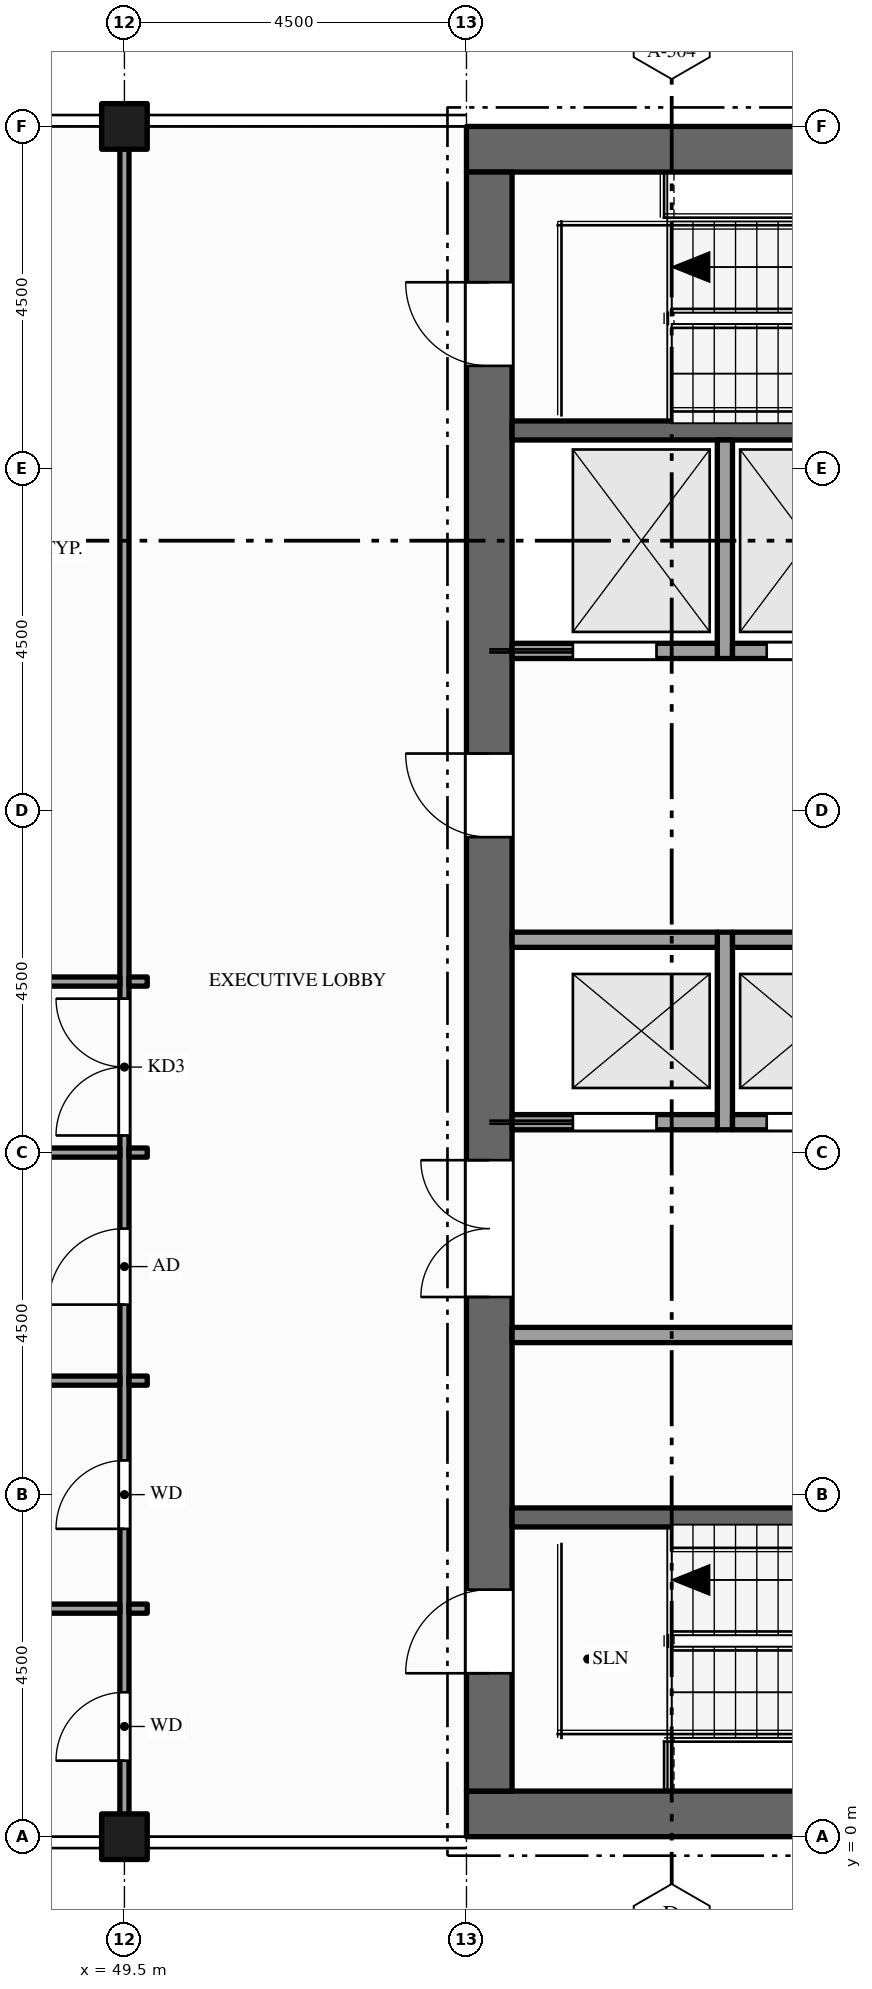
"""IFC4 building model, lengths in metres.
Left out: names, types, materials, properties, quantities, classifications, styles, units other than length and angle.
Written with IfcOpenShell. Run it as: python <this file> out.ifc"""

import sys

from ifc_helpers import new_model, si_unit, direction, frame, frame_2d, origin, origin_2d, place, context, subcontext, project, spatial, rectangle, hollow_rectangle, extrude, element, fill, save


model = new_model("IFC4")
c1 = context("Model", 3, precision=1e-05, world=origin(), true_north=direction((0.0, 1.0)))
c2 = subcontext(c1, "Body", "Model", "MODEL_VIEW")
j1 = project(units=[si_unit("LENGTHUNIT", "METRE"), si_unit("PLANEANGLEUNIT", "RADIAN")], contexts=[c1])
p1 = place(None, origin())
s1 = spatial("IfcSite", under=j1, at=p1, CompositionType="ELEMENT")
p2 = place(p1, origin())
s2 = spatial("IfcBuilding", under=s1, at=p2, CompositionType="ELEMENT")
p3 = place(p2, frame((0.0, 0.0, 327.5)))
s3 = spatial("IfcBuildingStorey", under=s2, at=p3, CompositionType="ELEMENT", Elevation=327.5)
for number, where, z_axis, x_axis in (
    (1, (67.5, 0.3, -0.15), (0.0, 0.0, 1.0), (-1.0, 0.0, 0.0)),
    (2, (54.0, 22.2, -0.15), (0.0, 0.0, 1.0), (1.0, 0.0, 0.0)),
):
    element("IfcWall", number, at=place(p3, frame(where, z_axis=z_axis, x_axis=x_axis)), inside=s3, PredefinedType="SHEAR", context=c2, shape_type="SweptSolid", body=[
        extrude(rectangle(XDim=13.5, YDim=0.6, at=frame_2d((6.75, 0.0))), origin(), (0.0, 0.0, 1.0), 4.5),
    ])
p4 = place(p3, frame((54.3, 0.6, -0.15), z_axis=(0.0, 0.0, 1.0), x_axis=(0.0, 1.0, 0.0)))
e3 = element("IfcWall", 3, at=p4, inside=s3, PredefinedType="SHEAR", context=c2, shape_type="SweptSolid", body=[
    extrude(rectangle(XDim=21.3, YDim=0.6, at=frame_2d((10.65, 0.0))), origin(), (0.0, 0.0, 1.0), 4.5),
])
p5 = place(p4, frame((6.5, 0.0, 0.15)))
e4 = element("IfcOpeningElement", 4, at=p5, cuts=e3, PredefinedType="OPENING", context=c2, shape_type="SweptSolid", body=[
    extrude(rectangle(XDim=1.8, YDim=2.1, at=frame_2d((0.9, 1.05))), frame((0.0, 0.31, 0.0), z_axis=(0.0, -1.0, 0.0), x_axis=(1.0, 0.0, 0.0)), (0.0, 0.0, 1.0), 0.62),
])
p6 = place(p4, frame((12.55, 0.0, 0.15)))
e5 = element("IfcOpeningElement", 5, at=p6, cuts=e3, PredefinedType="OPENING", context=c2, shape_type="SweptSolid", body=[
    extrude(rectangle(XDim=1.1, YDim=2.1, at=frame_2d((0.55, 1.05))), frame((0.0, 0.31, 0.0), z_axis=(0.0, -1.0, 0.0), x_axis=(1.0, 0.0, 0.0)), (0.0, 0.0, 1.0), 0.62),
])
p7 = place(p4, frame((1.55, 0.0, 0.15)))
e6 = element("IfcOpeningElement", 6, at=p7, cuts=e3, PredefinedType="OPENING", context=c2, shape_type="SweptSolid", body=[
    extrude(rectangle(XDim=1.1, YDim=2.1, at=frame_2d((0.55, 1.05))), frame((0.0, 0.31, 0.0), z_axis=(0.0, -1.0, 0.0), x_axis=(1.0, 0.0, 0.0)), (0.0, 0.0, 1.0), 0.62),
])
p8 = place(p4, frame((18.75, 0.0, 0.15)))
e7 = element("IfcOpeningElement", 7, at=p8, cuts=e3, PredefinedType="OPENING", context=c2, shape_type="SweptSolid", body=[
    extrude(rectangle(XDim=1.1, YDim=2.1, at=frame_2d((0.55, 1.05))), frame((0.0, 0.31, 0.0), z_axis=(0.0, -1.0, 0.0), x_axis=(1.0, 0.0, 0.0)), (0.0, 0.0, 1.0), 0.62),
])
for number, where, z_axis, x_axis in (
    (8, (49.5, 0.0, -0.15), (0.0, 0.0, 1.0), (1.0, 0.0, 0.0)),
    (9, (49.5, 22.5, -0.15), (0.0, 0.0, 1.0), (1.0, 0.0, 0.0)),
):
    element("IfcColumn", number, at=place(p3, frame(where, z_axis=z_axis, x_axis=x_axis)), inside=s3, PredefinedType="COLUMN", context=c2, shape_type="SweptSolid", body=[
        extrude(hollow_rectangle(XDim=0.6, YDim=0.6, WallThickness=0.03, at=origin_2d()), origin(), (0.0, 0.0, 1.0), 4.5),
    ])
p9 = place(p3, frame((49.5, 0.01, 0.0), z_axis=(0.0, 0.0, 1.0), x_axis=(0.0, 1.0, 0.0)))
e10 = element("IfcWall", 10, at=p9, inside=s3, PredefinedType="PARTITIONING", context=c2, shape_type="SweptSolid", body=[
    extrude(rectangle(XDim=22.48, YDim=0.12, at=frame_2d((11.24, 0.0))), origin(), (0.0, 0.0, 1.0), 3.359),
])
p10 = place(p9, frame((9.215, 0.0, 0.0)))
e11 = element("IfcOpeningElement", 11, at=p10, cuts=e10, PredefinedType="OPENING", context=c2, shape_type="SweptSolid", body=[
    extrude(rectangle(XDim=1.8, YDim=2.1, at=frame_2d((0.9, 1.05))), frame((0.0, 0.07, 0.0), z_axis=(0.0, -1.0, 0.0), x_axis=(1.0, 0.0, 0.0)), (0.0, 0.0, 1.0), 0.14),
])
p11 = place(p9, frame((0.99, 0.0, 0.0)))
e12 = element("IfcOpeningElement", 12, at=p11, cuts=e10, PredefinedType="OPENING", context=c2, shape_type="SweptSolid", body=[
    extrude(rectangle(XDim=0.9, YDim=2.1, at=frame_2d((0.45, 1.05))), frame((0.0, 0.07, 0.0), z_axis=(0.0, -1.0, 0.0), x_axis=(1.0, 0.0, 0.0)), (0.0, 0.0, 1.0), 0.14),
])
p12 = place(p9, frame((4.04, 0.0, 0.0)))
e13 = element("IfcOpeningElement", 13, at=p12, cuts=e10, PredefinedType="OPENING", context=c2, shape_type="SweptSolid", body=[
    extrude(rectangle(XDim=0.9, YDim=2.1, at=frame_2d((0.45, 1.05))), frame((0.0, 0.07, 0.0), z_axis=(0.0, -1.0, 0.0), x_axis=(1.0, 0.0, 0.0)), (0.0, 0.0, 1.0), 0.14),
])
p13 = place(p9, frame((6.99, 0.0, 0.0)))
e14 = element("IfcOpeningElement", 14, at=p13, cuts=e10, PredefinedType="OPENING", context=c2, shape_type="SweptSolid", body=[
    extrude(rectangle(XDim=1.0, YDim=2.1, at=frame_2d((0.5, 1.05))), frame((0.0, 0.07, 0.0), z_axis=(0.0, -1.0, 0.0), x_axis=(1.0, 0.0, 0.0)), (0.0, 0.0, 1.0), 0.14),
])
p14 = place(p3, frame((57.4, 9.3, 0.0), z_axis=(0.0, 0.0, 1.0), x_axis=(0.0, 1.0, 0.0)))
e15 = element("IfcWall", 15, at=p14, inside=s3, PredefinedType="SOLIDWALL", context=c2, shape_type="SweptSolid", body=[
    extrude(rectangle(XDim=2.6, YDim=0.2, at=frame_2d((1.3, 0.0))), origin(), (0.0, 0.0, 1.0), 4.35),
])
p15 = place(p3, frame((57.4, 15.5, 0.0), z_axis=(0.0, 0.0, 1.0), x_axis=(0.0, 1.0, 0.0)))
e16 = element("IfcWall", 16, at=p15, inside=s3, PredefinedType="SOLIDWALL", context=c2, shape_type="SweptSolid", body=[
    extrude(rectangle(XDim=2.875, YDim=0.2, at=frame_2d((1.438, 0.0))), origin(), (0.0, 0.0, 1.0), 4.35),
])
p16 = place(p3, frame((45.06, 3.0, 0.0), z_axis=(0.0, 0.0, 1.0), x_axis=(1.0, 0.0, 0.0)))
e17 = element("IfcWall", 17, at=p16, inside=s3, PredefinedType="PARTITIONING", context=c2, shape_type="SweptSolid", body=[
    extrude(rectangle(XDim=4.38, YDim=0.12, at=frame_2d((2.19, 0.0))), origin(), (0.0, 0.0, 1.0), 3.359),
])
p17 = place(p3, frame((49.56, 3.0, 0.0), z_axis=(0.0, 0.0, 1.0), x_axis=(1.0, 0.0, 0.0)))
e18 = element("IfcWall", 18, at=p17, inside=s3, PredefinedType="PARTITIONING", context=c2, shape_type="SweptSolid", body=[
    extrude(rectangle(XDim=0.24, YDim=0.12, at=frame_2d((0.12, 0.0))), origin(), (0.0, 0.0, 1.0), 3.359),
])
p18 = place(p3, frame((54.6, 4.2, 0.0), z_axis=(0.0, 0.0, 1.0), x_axis=(1.0, 0.0, 0.0)))
e19 = element("IfcWall", 19, at=p18, inside=s3, PredefinedType="SHEAR", context=c2, shape_type="SweptSolid", body=[
    extrude(rectangle(XDim=6.675, YDim=0.25, at=frame_2d((3.337, 0.0))), origin(), (0.0, 0.0, 1.0), 4.35),
])
p19 = place(p3, frame((45.06, 6.0, 0.0), z_axis=(0.0, 0.0, 1.0), x_axis=(1.0, 0.0, 0.0)))
e20 = element("IfcWall", 20, at=p19, inside=s3, PredefinedType="PARTITIONING", context=c2, shape_type="SweptSolid", body=[
    extrude(rectangle(XDim=4.38, YDim=0.12, at=frame_2d((2.19, 0.0))), origin(), (0.0, 0.0, 1.0), 3.359),
])
p20 = place(p3, frame((49.56, 6.0, 0.0), z_axis=(0.0, 0.0, 1.0), x_axis=(1.0, 0.0, 0.0)))
e21 = element("IfcWall", 21, at=p20, inside=s3, PredefinedType="PARTITIONING", context=c2, shape_type="SweptSolid", body=[
    extrude(rectangle(XDim=0.24, YDim=0.12, at=frame_2d((0.12, 0.0))), origin(), (0.0, 0.0, 1.0), 3.359),
])
p21 = place(p3, frame((54.6, 6.6, 0.0), z_axis=(0.0, 0.0, 1.0), x_axis=(1.0, 0.0, 0.0)))
e22 = element("IfcWall", 22, at=p21, inside=s3, PredefinedType="PARTITIONING", context=c2, shape_type="SweptSolid", body=[
    extrude(rectangle(XDim=9.25, YDim=0.2, at=frame_2d((4.625, 0.0))), origin(), (0.0, 0.0, 1.0), 4.35),
])
p22 = place(p21, frame((4.175, 0.0, 0.0)))
e23 = element("IfcOpeningElement", 23, at=p22, cuts=e22, PredefinedType="OPENING", context=c2, shape_type="SweptSolid", body=[
    extrude(rectangle(XDim=0.9, YDim=2.1, at=frame_2d((0.45, 1.05))), frame((0.0, 0.11, 0.0), z_axis=(0.0, -1.0, 0.0), x_axis=(1.0, 0.0, 0.0)), (0.0, 0.0, 1.0), 0.22),
])
p23 = place(p3, frame((45.06, 9.0, 0.0), z_axis=(0.0, 0.0, 1.0), x_axis=(1.0, 0.0, 0.0)))
e24 = element("IfcWall", 24, at=p23, inside=s3, PredefinedType="PARTITIONING", context=c2, shape_type="SweptSolid", body=[
    extrude(rectangle(XDim=4.38, YDim=0.12, at=frame_2d((2.19, 0.0))), origin(), (0.0, 0.0, 1.0), 3.359),
])
p24 = place(p3, frame((49.56, 9.0, 0.0), z_axis=(0.0, 0.0, 1.0), x_axis=(1.0, 0.0, 0.0)))
e25 = element("IfcWall", 25, at=p24, inside=s3, PredefinedType="PARTITIONING", context=c2, shape_type="SweptSolid", body=[
    extrude(rectangle(XDim=0.24, YDim=0.12, at=frame_2d((0.12, 0.0))), origin(), (0.0, 0.0, 1.0), 3.359),
])
p25 = place(p3, frame((54.6, 9.4, 0.0), z_axis=(0.0, 0.0, 1.0), x_axis=(1.0, 0.0, 0.0)))
e26 = element("IfcWall", 26, at=p25, inside=s3, PredefinedType="SOLIDWALL", context=c2, shape_type="SweptSolid", body=[
    extrude(rectangle(XDim=2.7, YDim=0.2, at=frame_2d((1.35, 0.0))), origin(), (0.0, 0.0, 1.0), 4.35),
])
p26 = place(p25, frame((0.8, 0.0, 0.012)))
e27 = element("IfcOpeningElement", 27, at=p26, cuts=e26, PredefinedType="OPENING", context=c2, shape_type="SweptSolid", body=[
    extrude(rectangle(XDim=1.1, YDim=2.1, at=frame_2d((0.55, 1.05))), frame((0.0, 0.11, 0.0), z_axis=(0.0, -1.0, 0.0), x_axis=(1.0, 0.0, 0.0)), (0.0, 0.0, 1.0), 0.22),
])
p27 = place(p3, frame((57.5, 9.4, 0.0), z_axis=(0.0, 0.0, 1.0), x_axis=(1.0, 0.0, 0.0)))
e28 = element("IfcWall", 28, at=p27, inside=s3, PredefinedType="SOLIDWALL", context=c2, shape_type="SweptSolid", body=[
    extrude(rectangle(XDim=2.0, YDim=0.2, at=frame_2d((1.0, 0.0))), origin(), (0.0, 0.0, 1.0), 4.35),
])
p28 = place(p27, frame((0.45, 0.0, 0.012)))
e29 = element("IfcOpeningElement", 29, at=p28, cuts=e28, PredefinedType="OPENING", context=c2, shape_type="SweptSolid", body=[
    extrude(rectangle(XDim=1.1, YDim=2.1, at=frame_2d((0.55, 1.05))), frame((0.0, 0.11, 0.0), z_axis=(0.0, -1.0, 0.0), x_axis=(1.0, 0.0, 0.0)), (0.0, 0.0, 1.0), 0.22),
])
p29 = place(p3, frame((40.56, 11.25, 0.0), z_axis=(0.0, 0.0, 1.0), x_axis=(1.0, 0.0, 0.0)))
e30 = element("IfcWall", 30, at=p29, inside=s3, PredefinedType="PARTITIONING", context=c2, shape_type="SweptSolid", body=[
    extrude(rectangle(XDim=8.88, YDim=0.12, at=frame_2d((4.44, 0.0))), origin(), (0.0, 0.0, 1.0), 3.359),
])
p30 = place(p29, frame((3.84, 0.0, 0.0)))
e31 = element("IfcOpeningElement", 31, at=p30, cuts=e30, PredefinedType="OPENING", context=c2, shape_type="SweptSolid", body=[
    extrude(rectangle(XDim=1.2, YDim=2.1, at=frame_2d((0.6, 1.05))), frame((0.0, 0.07, 0.0), z_axis=(0.0, -1.0, 0.0), x_axis=(1.0, 0.0, 0.0)), (0.0, 0.0, 1.0), 0.14),
])
p31 = place(p3, frame((49.56, 11.25, 0.0), z_axis=(0.0, 0.0, 1.0), x_axis=(1.0, 0.0, 0.0)))
e32 = element("IfcWall", 32, at=p31, inside=s3, PredefinedType="PARTITIONING", context=c2, shape_type="SweptSolid", body=[
    extrude(rectangle(XDim=0.24, YDim=0.12, at=frame_2d((0.12, 0.0))), origin(), (0.0, 0.0, 1.0), 3.359),
])
p32 = place(p3, frame((54.6, 11.8, 0.0), z_axis=(0.0, 0.0, 1.0), x_axis=(1.0, 0.0, 0.0)))
e33 = element("IfcWall", 33, at=p32, inside=s3, PredefinedType="SOLIDWALL", context=c2, shape_type="SweptSolid", body=[
    extrude(rectangle(XDim=2.7, YDim=0.2, at=frame_2d((1.35, 0.0))), origin(), (0.0, 0.0, 1.0), 4.35),
])
p33 = place(p3, frame((57.5, 11.8, 0.0), z_axis=(0.0, 0.0, 1.0), x_axis=(1.0, 0.0, 0.0)))
e34 = element("IfcWall", 34, at=p33, inside=s3, PredefinedType="SOLIDWALL", context=c2, shape_type="SweptSolid", body=[
    extrude(rectangle(XDim=2.0, YDim=0.2, at=frame_2d((1.0, 0.0))), origin(), (0.0, 0.0, 1.0), 4.35),
])
p34 = place(p3, frame((54.6, 15.6, 0.0), z_axis=(0.0, 0.0, 1.0), x_axis=(1.0, 0.0, 0.0)))
e35 = element("IfcWall", 35, at=p34, inside=s3, PredefinedType="SOLIDWALL", context=c2, shape_type="SweptSolid", body=[
    extrude(rectangle(XDim=2.7, YDim=0.2, at=frame_2d((1.35, 0.0))), origin(), (0.0, 0.0, 1.0), 4.35),
])
p35 = place(p34, frame((0.8, 0.0, 0.012)))
e36 = element("IfcOpeningElement", 36, at=p35, cuts=e35, PredefinedType="OPENING", context=c2, shape_type="SweptSolid", body=[
    extrude(rectangle(XDim=1.1, YDim=2.1, at=frame_2d((0.55, 1.05))), frame((0.0, 0.11, 0.0), z_axis=(0.0, -1.0, 0.0), x_axis=(1.0, 0.0, 0.0)), (0.0, 0.0, 1.0), 0.22),
])
p36 = place(p3, frame((57.5, 15.6, 0.0), z_axis=(0.0, 0.0, 1.0), x_axis=(1.0, 0.0, 0.0)))
e37 = element("IfcWall", 37, at=p36, inside=s3, PredefinedType="SOLIDWALL", context=c2, shape_type="SweptSolid", body=[
    extrude(rectangle(XDim=2.0, YDim=0.2, at=frame_2d((1.0, 0.0))), origin(), (0.0, 0.0, 1.0), 4.35),
])
p37 = place(p36, frame((0.45, 0.0, 0.012)))
e38 = element("IfcOpeningElement", 38, at=p37, cuts=e37, PredefinedType="OPENING", context=c2, shape_type="SweptSolid", body=[
    extrude(rectangle(XDim=1.1, YDim=2.1, at=frame_2d((0.55, 1.05))), frame((0.0, 0.11, 0.0), z_axis=(0.0, -1.0, 0.0), x_axis=(1.0, 0.0, 0.0)), (0.0, 0.0, 1.0), 0.22),
])
p38 = place(p3, frame((54.6, 18.5, 0.0), z_axis=(0.0, 0.0, 1.0), x_axis=(1.0, 0.0, 0.0)))
e39 = element("IfcWall", 39, at=p38, inside=s3, PredefinedType="SHEAR", context=c2, shape_type="SweptSolid", body=[
    extrude(rectangle(XDim=6.675, YDim=0.25, at=frame_2d((3.337, 0.0))), origin(), (0.0, 0.0, 1.0), 4.35),
])
p39 = place(p26, origin())
e40 = element("IfcDoor", 40, at=p39, inside=s3, OperationType="SLIDING_TO_LEFT", PredefinedType="DOOR", context=c2, shape_type="SweptSolid", body=[
    extrude(rectangle(XDim=1.1, YDim=2.1, at=frame_2d((0.55, 1.05))), frame((0.0, 0.025, 0.0), z_axis=(0.0, -1.0, 0.0), x_axis=(1.0, 0.0, 0.0)), (0.0, 0.0, 1.0), 0.05),
])
fill(e27, e40)
p40 = place(p28, origin())
e41 = element("IfcDoor", 41, at=p40, inside=s3, OperationType="SLIDING_TO_RIGHT", PredefinedType="DOOR", context=c2, shape_type="SweptSolid", body=[
    extrude(rectangle(XDim=1.1, YDim=2.1, at=frame_2d((0.55, 1.05))), frame((0.0, 0.025, 0.0), z_axis=(0.0, -1.0, 0.0), x_axis=(1.0, 0.0, 0.0)), (0.0, 0.0, 1.0), 0.05),
])
fill(e29, e41)
p41 = place(p35, origin())
e42 = element("IfcDoor", 42, at=p41, inside=s3, OperationType="SLIDING_TO_LEFT", PredefinedType="DOOR", context=c2, shape_type="SweptSolid", body=[
    extrude(rectangle(XDim=1.1, YDim=2.1, at=frame_2d((0.55, 1.05))), frame((0.0, 0.025, 0.0), z_axis=(0.0, -1.0, 0.0), x_axis=(1.0, 0.0, 0.0)), (0.0, 0.0, 1.0), 0.05),
])
fill(e36, e42)
p42 = place(p37, origin())
e43 = element("IfcDoor", 43, at=p42, inside=s3, OperationType="SLIDING_TO_RIGHT", PredefinedType="DOOR", context=c2, shape_type="SweptSolid", body=[
    extrude(rectangle(XDim=1.1, YDim=2.1, at=frame_2d((0.55, 1.05))), frame((0.0, 0.025, 0.0), z_axis=(0.0, -1.0, 0.0), x_axis=(1.0, 0.0, 0.0)), (0.0, 0.0, 1.0), 0.05),
])
fill(e38, e43)
p43 = place(p5, origin())
e44 = element("IfcDoor", 44, at=p43, inside=s3, OperationType="DOUBLE_DOOR_SINGLE_SWING", PredefinedType="DOOR", context=c2, shape_type="SweptSolid", body=[
    extrude(rectangle(XDim=1.8, YDim=2.1, at=frame_2d((0.9, 1.05))), frame((0.0, 0.025, 0.0), z_axis=(0.0, -1.0, 0.0), x_axis=(1.0, 0.0, 0.0)), (0.0, 0.0, 1.0), 0.05),
])
fill(e4, e44)
p44 = place(p6, origin())
e45 = element("IfcDoor", 45, at=p44, inside=s3, OperationType="SINGLE_SWING_RIGHT", PredefinedType="DOOR", context=c2, shape_type="SweptSolid", body=[
    extrude(rectangle(XDim=1.1, YDim=2.1, at=frame_2d((0.55, 1.05))), frame((0.0, 0.025, 0.0), z_axis=(0.0, -1.0, 0.0), x_axis=(1.0, 0.0, 0.0)), (0.0, 0.0, 1.0), 0.05),
])
fill(e5, e45)
p45 = place(p7, origin())
e46 = element("IfcDoor", 46, at=p45, inside=s3, OperationType="SINGLE_SWING_LEFT", PredefinedType="DOOR", context=c2, shape_type="SweptSolid", body=[
    extrude(rectangle(XDim=1.1, YDim=2.1, at=frame_2d((0.55, 1.05))), frame((0.0, 0.025, 0.0), z_axis=(0.0, -1.0, 0.0), x_axis=(1.0, 0.0, 0.0)), (0.0, 0.0, 1.0), 0.05),
])
fill(e6, e46)
p46 = place(p8, origin())
e47 = element("IfcDoor", 47, at=p46, inside=s3, OperationType="SINGLE_SWING_RIGHT", PredefinedType="DOOR", context=c2, shape_type="SweptSolid", body=[
    extrude(rectangle(XDim=1.1, YDim=2.1, at=frame_2d((0.55, 1.05))), frame((0.0, 0.025, 0.0), z_axis=(0.0, -1.0, 0.0), x_axis=(1.0, 0.0, 0.0)), (0.0, 0.0, 1.0), 0.05),
])
fill(e7, e47)
p47 = place(p10, origin())
e48 = element("IfcDoor", 48, at=p47, inside=s3, OperationType="DOUBLE_DOOR_SINGLE_SWING", PredefinedType="DOOR", context=c2, shape_type="SweptSolid", body=[
    extrude(rectangle(XDim=1.8, YDim=2.1, at=frame_2d((0.9, 1.05))), frame((0.0, 0.025, 0.0), z_axis=(0.0, -1.0, 0.0), x_axis=(1.0, 0.0, 0.0)), (0.0, 0.0, 1.0), 0.05),
])
fill(e11, e48)
p48 = place(p11, origin())
e49 = element("IfcDoor", 49, at=p48, inside=s3, OperationType="SINGLE_SWING_LEFT", PredefinedType="DOOR", context=c2, shape_type="SweptSolid", body=[
    extrude(rectangle(XDim=0.9, YDim=2.1, at=frame_2d((0.45, 1.05))), frame((0.0, 0.025, 0.0), z_axis=(0.0, -1.0, 0.0), x_axis=(1.0, 0.0, 0.0)), (0.0, 0.0, 1.0), 0.05),
])
fill(e12, e49)
p49 = place(p12, origin())
e50 = element("IfcDoor", 50, at=p49, inside=s3, OperationType="SINGLE_SWING_LEFT", PredefinedType="DOOR", context=c2, shape_type="SweptSolid", body=[
    extrude(rectangle(XDim=0.9, YDim=2.1, at=frame_2d((0.45, 1.05))), frame((0.0, 0.025, 0.0), z_axis=(0.0, -1.0, 0.0), x_axis=(1.0, 0.0, 0.0)), (0.0, 0.0, 1.0), 0.05),
])
fill(e13, e50)
p50 = place(p13, origin())
e51 = element("IfcDoor", 51, at=p50, inside=s3, OperationType="SINGLE_SWING_LEFT", PredefinedType="DOOR", context=c2, shape_type="SweptSolid", body=[
    extrude(rectangle(XDim=1.0, YDim=2.1, at=frame_2d((0.5, 1.05))), frame((0.0, 0.025, 0.0), z_axis=(0.0, -1.0, 0.0), x_axis=(1.0, 0.0, 0.0)), (0.0, 0.0, 1.0), 0.05),
])
fill(e14, e51)
save(model, sys.argv[1])
